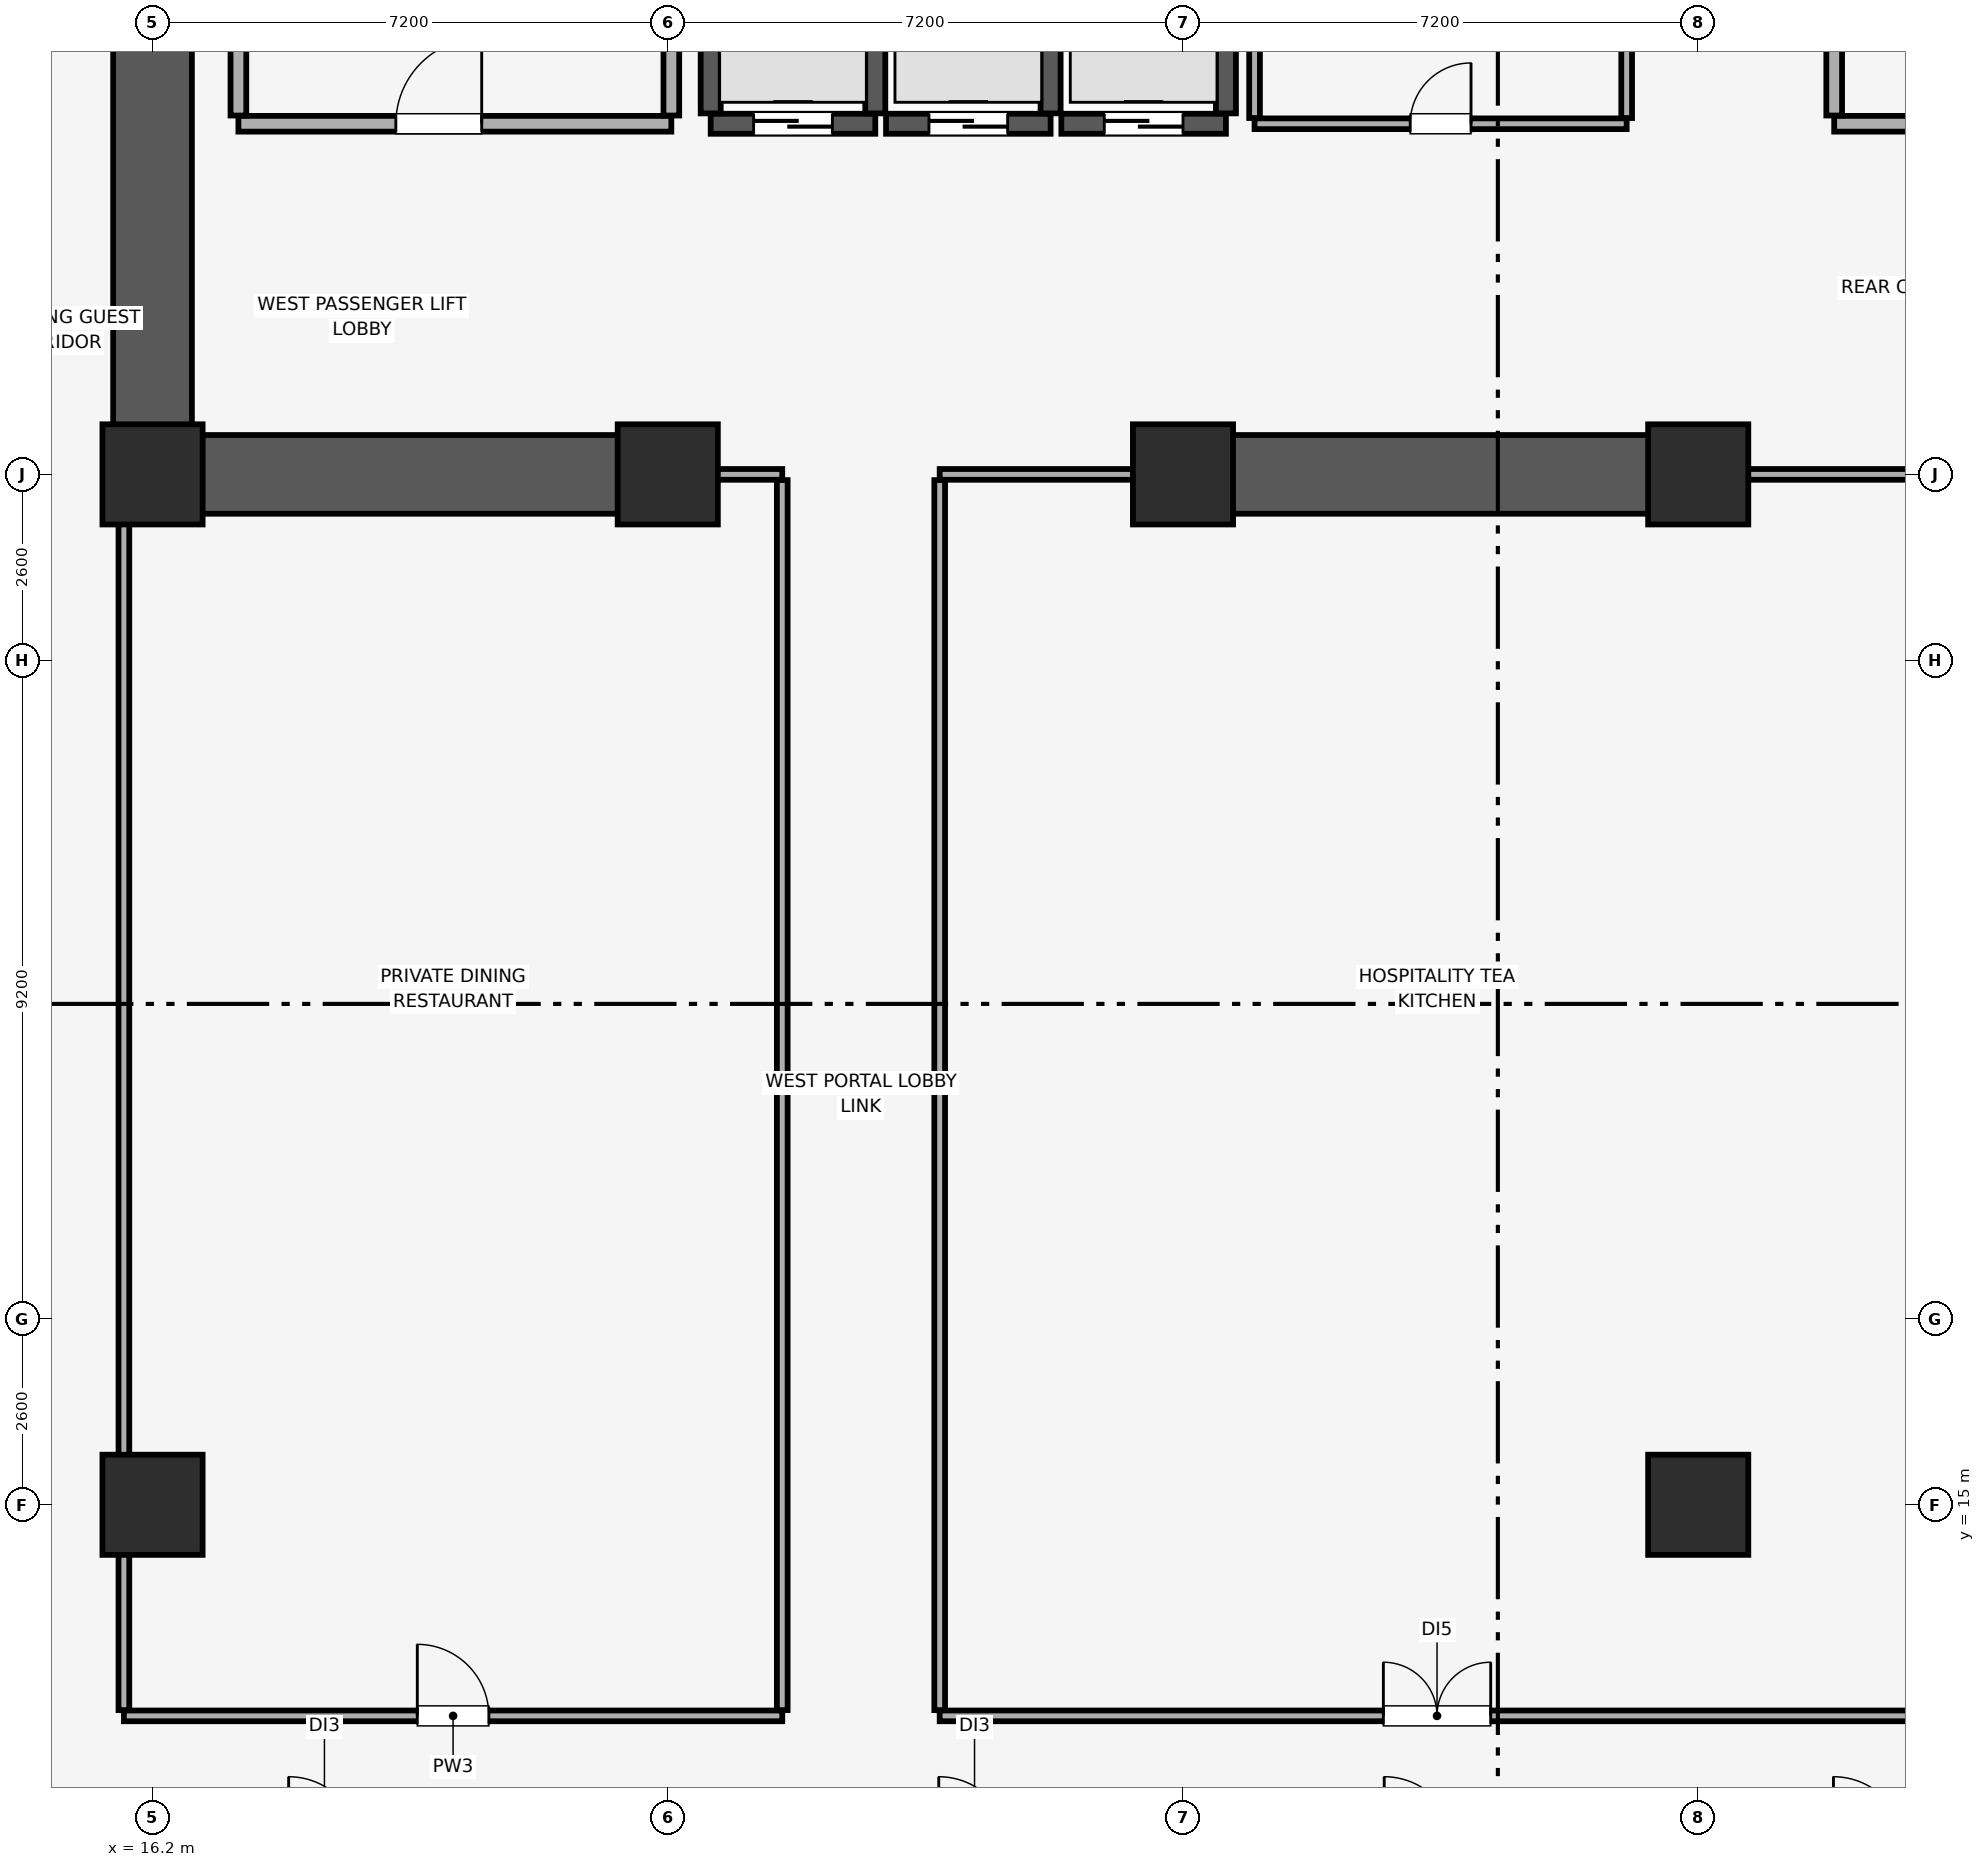
"""IFC4 building model, lengths in metres.
Left out: names, types, materials, properties, quantities, classifications, styles, units other than length and angle.
Written with IfcOpenShell. Run it as: python <this file> out.ifc"""

import sys

from ifc_helpers import new_model, si_unit, direction, frame, frame_2d, origin, origin_2d, place, context, subcontext, project, spatial, rectangle, extrude, element, fill, save


model = new_model("IFC4")
c1 = context("Model", 3, precision=1e-05, world=origin(), true_north=direction((0.0, 1.0)))
c2 = subcontext(c1, "Body", "Model", "MODEL_VIEW")
j1 = project(units=[si_unit("LENGTHUNIT", "METRE"), si_unit("PLANEANGLEUNIT", "RADIAN")], contexts=[c1])
p1 = place(None, origin())
s1 = spatial("IfcSite", under=j1, at=p1, CompositionType="ELEMENT")
p2 = place(p1, origin())
s2 = spatial("IfcBuilding", under=s1, at=p2, CompositionType="ELEMENT")
p3 = place(p2, frame((0.0, 0.0, 46.4)))
s3 = spatial("IfcBuildingStorey", under=s2, at=p3, CompositionType="ELEMENT", Elevation=46.4)
for number, where, z_axis, x_axis in (
    (1, (16.2, 15.0, 0.0), (0.0, 0.0, 1.0), (1.0, 0.0, 0.0)),
    (2, (37.8, 15.0, 0.0), (0.0, 0.0, 1.0), (1.0, 0.0, 0.0)),
    (3, (16.2, 29.4, 0.0), (0.0, 0.0, 1.0), (1.0, 0.0, 0.0)),
    (4, (23.4, 29.4, 0.0), (0.0, 0.0, 1.0), (1.0, 0.0, 0.0)),
    (5, (30.6, 29.4, 0.0), (0.0, 0.0, 1.0), (1.0, 0.0, 0.0)),
    (6, (37.8, 29.4, 0.0), (0.0, 0.0, 1.0), (1.0, 0.0, 0.0)),
):
    element("IfcColumn", number, at=place(p3, frame(where, z_axis=z_axis, x_axis=x_axis)), inside=s3, PredefinedType="COLUMN", context=c2, shape_type="SweptSolid", body=[
        extrude(rectangle(XDim=1.4, YDim=1.4, at=origin_2d()), origin(), (0.0, 0.0, 1.0), 3.51),
    ])
p4 = place(p3, frame((16.2, 29.4, 0.0), z_axis=(0.0, 0.0, 1.0), x_axis=(0.0, 1.0, 0.0)))
e7 = element("IfcWall", 7, at=p4, inside=s3, PredefinedType="SHEAR", context=c2, shape_type="SweptSolid", body=[
    extrude(rectangle(XDim=19.2, YDim=1.1, at=frame_2d((9.6, 0.0))), origin(), (0.0, 0.0, 1.0), 3.51),
])
p5 = place(p3, frame((16.755, 29.4, 0.0), z_axis=(0.0, 0.0, 1.0), x_axis=(1.0, 0.0, 0.0)))
e8 = element("IfcWall", 8, at=p5, inside=s3, PredefinedType="SHEAR", context=c2, shape_type="SweptSolid", body=[
    extrude(rectangle(XDim=6.845, YDim=1.1, at=frame_2d((3.423, 0.0))), origin(), (0.0, 0.0, 1.0), 3.51),
])
p6 = place(p3, frame((30.4, 29.4, 0.0), z_axis=(0.0, 0.0, 1.0), x_axis=(1.0, 0.0, 0.0)))
e9 = element("IfcWall", 9, at=p6, inside=s3, PredefinedType="SHEAR", context=c2, shape_type="SweptSolid", body=[
    extrude(rectangle(XDim=7.6, YDim=1.1, at=frame_2d((3.8, 0.0))), origin(), (0.0, 0.0, 1.0), 3.51),
])
p7 = place(p3, frame((24.0, 34.3, 0.0), z_axis=(0.0, 0.0, 1.0), x_axis=(1.0, 0.0, 0.0)))
e10 = element("IfcWall", 10, at=p7, inside=s3, PredefinedType="SHEAR", context=c2, shape_type="SweptSolid", body=[
    extrude(rectangle(XDim=2.3, YDim=0.28, at=frame_2d((1.15, 0.0))), origin(), (0.0, 0.0, 1.0), 3.51),
])
p8 = place(p7, frame((0.6, 0.0, 0.0)))
e11 = element("IfcOpeningElement", 11, at=p8, cuts=e10, PredefinedType="OPENING", context=c2, shape_type="SweptSolid", body=[
    extrude(rectangle(XDim=1.1, YDim=2.2, at=frame_2d((0.55, 1.1))), frame((0.0, 0.15, 0.0), z_axis=(0.0, -1.0, 0.0), x_axis=(1.0, 0.0, 0.0)), (0.0, 0.0, 1.0), 0.3),
])
for number, where, z_axis, x_axis in (
    (12, (24.0, 34.445, 0.0), (0.0, 0.0, 1.0), (0.0, 1.0, 0.0)),
    (13, (26.3, 34.445, 0.0), (0.0, 0.0, 1.0), (0.0, 1.0, 0.0)),
):
    element("IfcWall", number, at=place(p3, frame(where, z_axis=z_axis, x_axis=x_axis)), inside=s3, PredefinedType="SHEAR", context=c2, shape_type="SweptSolid", body=[
        extrude(rectangle(XDim=2.01, YDim=0.28, at=frame_2d((1.005, 0.0))), origin(), (0.0, 0.0, 1.0), 3.51),
    ])
p9 = place(p3, frame((26.45, 34.3, 0.0), z_axis=(0.0, 0.0, 1.0), x_axis=(1.0, 0.0, 0.0)))
e14 = element("IfcWall", 14, at=p9, inside=s3, PredefinedType="SHEAR", context=c2, shape_type="SweptSolid", body=[
    extrude(rectangle(XDim=2.3, YDim=0.28, at=frame_2d((1.15, 0.0))), origin(), (0.0, 0.0, 1.0), 3.51),
])
p10 = place(p9, frame((0.6, 0.0, 0.0)))
e15 = element("IfcOpeningElement", 15, at=p10, cuts=e14, PredefinedType="OPENING", context=c2, shape_type="SweptSolid", body=[
    extrude(rectangle(XDim=1.1, YDim=2.2, at=frame_2d((0.55, 1.1))), frame((0.0, 0.15, 0.0), z_axis=(0.0, -1.0, 0.0), x_axis=(1.0, 0.0, 0.0)), (0.0, 0.0, 1.0), 0.3),
])
p11 = place(p3, frame((28.75, 34.445, 0.0), z_axis=(0.0, 0.0, 1.0), x_axis=(0.0, 1.0, 0.0)))
e16 = element("IfcWall", 16, at=p11, inside=s3, PredefinedType="SHEAR", context=c2, shape_type="SweptSolid", body=[
    extrude(rectangle(XDim=2.01, YDim=0.28, at=frame_2d((1.005, 0.0))), origin(), (0.0, 0.0, 1.0), 3.51),
])
p12 = place(p3, frame((28.9, 34.3, 0.0), z_axis=(0.0, 0.0, 1.0), x_axis=(1.0, 0.0, 0.0)))
e17 = element("IfcWall", 17, at=p12, inside=s3, PredefinedType="SHEAR", context=c2, shape_type="SweptSolid", body=[
    extrude(rectangle(XDim=2.3, YDim=0.28, at=frame_2d((1.15, 0.0))), origin(), (0.0, 0.0, 1.0), 3.51),
])
p13 = place(p12, frame((0.6, 0.0, 0.0)))
e18 = element("IfcOpeningElement", 18, at=p13, cuts=e17, PredefinedType="OPENING", context=c2, shape_type="SweptSolid", body=[
    extrude(rectangle(XDim=1.1, YDim=2.2, at=frame_2d((0.55, 1.1))), frame((0.0, 0.15, 0.0), z_axis=(0.0, -1.0, 0.0), x_axis=(1.0, 0.0, 0.0)), (0.0, 0.0, 1.0), 0.3),
])
p14 = place(p3, frame((31.2, 34.445, 0.0), z_axis=(0.0, 0.0, 1.0), x_axis=(0.0, 1.0, 0.0)))
e19 = element("IfcWall", 19, at=p14, inside=s3, PredefinedType="SHEAR", context=c2, shape_type="SweptSolid", body=[
    extrude(rectangle(XDim=2.01, YDim=0.28, at=frame_2d((1.005, 0.0))), origin(), (0.0, 0.0, 1.0), 3.51),
])
p15 = place(p3, frame((17.4, 34.3, 0.0), z_axis=(0.0, 0.0, 1.0), x_axis=(1.0, 0.0, 0.0)))
e20 = element("IfcWall", 20, at=p15, inside=s3, PredefinedType="PARTITIONING", context=c2, shape_type="SweptSolid", body=[
    extrude(rectangle(XDim=6.05, YDim=0.22, at=frame_2d((3.025, 0.0))), origin(), (0.0, 0.0, 1.0), 3.51),
])
p16 = place(p15, frame((2.2, 0.0, 0.0)))
e21 = element("IfcOpeningElement", 21, at=p16, cuts=e20, PredefinedType="OPENING", context=c2, shape_type="SweptSolid", body=[
    extrude(rectangle(XDim=1.2, YDim=2.15, at=frame_2d((0.6, 1.075))), frame((0.0, 0.12, 0.0), z_axis=(0.0, -1.0, 0.0), x_axis=(1.0, 0.0, 0.0)), (0.0, 0.0, 1.0), 0.24),
])
p17 = place(p3, frame((17.4, 34.415, 0.0), z_axis=(0.0, 0.0, 1.0), x_axis=(0.0, 1.0, 0.0)))
e22 = element("IfcWall", 22, at=p17, inside=s3, PredefinedType="PARTITIONING", context=c2, shape_type="SweptSolid", body=[
    extrude(rectangle(XDim=5.43, YDim=0.22, at=frame_2d((2.715, 0.0))), origin(), (0.0, 0.0, 1.0), 3.51),
])
p18 = place(p3, frame((23.45, 34.415, 0.0), z_axis=(0.0, 0.0, 1.0), x_axis=(0.0, 1.0, 0.0)))
e23 = element("IfcWall", 23, at=p18, inside=s3, PredefinedType="PARTITIONING", context=c2, shape_type="SweptSolid", body=[
    extrude(rectangle(XDim=5.64, YDim=0.22, at=frame_2d((2.82, 0.0))), origin(), (0.0, 0.0, 1.0), 3.51),
])
p19 = place(p3, frame((39.7, 34.3, 0.0), z_axis=(0.0, 0.0, 1.0), x_axis=(1.0, 0.0, 0.0)))
e24 = element("IfcWall", 24, at=p19, inside=s3, PredefinedType="PARTITIONING", context=c2, shape_type="SweptSolid", body=[
    extrude(rectangle(XDim=4.6, YDim=0.22, at=frame_2d((2.3, 0.0))), origin(), (0.0, 0.0, 1.0), 3.51),
])
p20 = place(p19, frame((1.7, 0.0, 0.0)))
e25 = element("IfcOpeningElement", 25, at=p20, cuts=e24, PredefinedType="OPENING", context=c2, shape_type="SweptSolid", body=[
    extrude(rectangle(XDim=1.2, YDim=2.15, at=frame_2d((0.6, 1.075))), frame((0.0, 0.12, 0.0), z_axis=(0.0, -1.0, 0.0), x_axis=(1.0, 0.0, 0.0)), (0.0, 0.0, 1.0), 0.24),
])
p21 = place(p3, frame((39.7, 34.415, 0.0), z_axis=(0.0, 0.0, 1.0), x_axis=(0.0, 1.0, 0.0)))
e26 = element("IfcWall", 26, at=p21, inside=s3, PredefinedType="PARTITIONING", context=c2, shape_type="SweptSolid", body=[
    extrude(rectangle(XDim=5.785, YDim=0.22, at=frame_2d((2.893, 0.0))), origin(), (0.0, 0.0, 1.0), 3.51),
])
p22 = place(p3, frame((31.6, 34.3, 0.0), z_axis=(0.0, 0.0, 1.0), x_axis=(1.0, 0.0, 0.0)))
e27 = element("IfcWall", 27, at=p22, inside=s3, PredefinedType="PARTITIONING", context=c2, shape_type="SweptSolid", body=[
    extrude(rectangle(XDim=5.2, YDim=0.15, at=frame_2d((2.6, 0.0))), origin(), (0.0, 0.0, 1.0), 3.51),
])
p23 = place(p22, frame((2.175, 0.0, 0.0)))
e28 = element("IfcOpeningElement", 28, at=p23, cuts=e27, PredefinedType="OPENING", context=c2, shape_type="SweptSolid", body=[
    extrude(rectangle(XDim=0.85, YDim=2.1, at=frame_2d((0.425, 1.05))), frame((0.0, 0.085, 0.0), z_axis=(0.0, -1.0, 0.0), x_axis=(1.0, 0.0, 0.0)), (0.0, 0.0, 1.0), 0.17),
])
for number, where, z_axis, x_axis in (
    (29, (31.6, 34.38, 0.0), (0.0, 0.0, 1.0), (0.0, 1.0, 0.0)),
    (30, (36.8, 34.38, 0.0), (0.0, 0.0, 1.0), (0.0, 1.0, 0.0)),
):
    element("IfcWall", number, at=place(p3, frame(where, z_axis=z_axis, x_axis=x_axis)), inside=s3, PredefinedType="PARTITIONING", context=c2, shape_type="SweptSolid", body=[
        extrude(rectangle(XDim=4.94, YDim=0.15, at=frame_2d((2.47, 0.0))), origin(), (0.0, 0.0, 1.0), 3.51),
    ])
p24 = place(p3, frame((15.8, 12.05, 0.0), z_axis=(0.0, 0.0, 1.0), x_axis=(1.0, 0.0, 0.0)))
e31 = element("IfcWall", 31, at=p24, inside=s3, PredefinedType="PARTITIONING", context=c2, shape_type="SweptSolid", body=[
    extrude(rectangle(XDim=9.2, YDim=0.15, at=frame_2d((4.6, 0.0))), origin(), (0.0, 0.0, 1.0), 3.51),
])
p25 = place(p24, frame((4.1, 0.0, 0.0)))
e32 = element("IfcOpeningElement", 32, at=p25, cuts=e31, PredefinedType="OPENING", context=c2, shape_type="SweptSolid", body=[
    extrude(rectangle(XDim=1.0, YDim=2.15, at=frame_2d((0.5, 1.075))), frame((0.0, 0.085, 0.0), z_axis=(0.0, -1.0, 0.0), x_axis=(1.0, 0.0, 0.0)), (0.0, 0.0, 1.0), 0.17),
])
p26 = place(p3, frame((23.61, 29.4, 0.0), z_axis=(0.0, 0.0, 1.0), x_axis=(1.0, 0.0, 0.0)))
e33 = element("IfcWall", 33, at=p26, inside=s3, PredefinedType="PARTITIONING", context=c2, shape_type="SweptSolid", body=[
    extrude(rectangle(XDim=1.39, YDim=0.15, at=frame_2d((0.695, 0.0))), origin(), (0.0, 0.0, 1.0), 2.41),
])
p27 = place(p3, frame((15.8, 12.13, 0.0), z_axis=(0.0, 0.0, 1.0), x_axis=(0.0, 1.0, 0.0)))
e34 = element("IfcWall", 34, at=p27, inside=s3, PredefinedType="PARTITIONING", context=c2, shape_type="SweptSolid", body=[
    extrude(rectangle(XDim=17.26, YDim=0.15, at=frame_2d((8.63, 0.0))), origin(), (0.0, 0.0, 1.0), 3.51),
])
p28 = place(p3, frame((25.0, 12.13, 0.0), z_axis=(0.0, 0.0, 1.0), x_axis=(0.0, 1.0, 0.0)))
e35 = element("IfcWall", 35, at=p28, inside=s3, PredefinedType="PARTITIONING", context=c2, shape_type="SweptSolid", body=[
    extrude(rectangle(XDim=17.19, YDim=0.15, at=frame_2d((8.595, 0.0))), origin(), (0.0, 0.0, 1.0), 3.51),
])
p29 = place(p3, frame((27.2, 12.05, 0.0), z_axis=(0.0, 0.0, 1.0), x_axis=(1.0, 0.0, 0.0)))
e36 = element("IfcWall", 36, at=p29, inside=s3, PredefinedType="PARTITIONING", context=c2, shape_type="SweptSolid", body=[
    extrude(rectangle(XDim=13.9, YDim=0.15, at=frame_2d((6.95, 0.0))), origin(), (0.0, 0.0, 1.0), 3.51),
])
p30 = place(p29, frame((6.2, 0.0, 0.0)))
e37 = element("IfcOpeningElement", 37, at=p30, cuts=e36, PredefinedType="OPENING", context=c2, shape_type="SweptSolid", body=[
    extrude(rectangle(XDim=1.5, YDim=2.25, at=frame_2d((0.75, 1.125))), frame((0.0, 0.085, 0.0), z_axis=(0.0, -1.0, 0.0), x_axis=(1.0, 0.0, 0.0)), (0.0, 0.0, 1.0), 0.17),
])
p31 = place(p3, frame((27.2, 29.4, 0.0), z_axis=(0.0, 0.0, 1.0), x_axis=(1.0, 0.0, 0.0)))
e38 = element("IfcWall", 38, at=p31, inside=s3, PredefinedType="PARTITIONING", context=c2, shape_type="SweptSolid", body=[
    extrude(rectangle(XDim=3.19, YDim=0.15, at=frame_2d((1.595, 0.0))), origin(), (0.0, 0.0, 1.0), 2.41),
])
p32 = place(p3, frame((38.01, 29.4, 0.0), z_axis=(0.0, 0.0, 1.0), x_axis=(1.0, 0.0, 0.0)))
e39 = element("IfcWall", 39, at=p32, inside=s3, PredefinedType="PARTITIONING", context=c2, shape_type="SweptSolid", body=[
    extrude(rectangle(XDim=3.09, YDim=0.15, at=frame_2d((1.545, 0.0))), origin(), (0.0, 0.0, 1.0), 2.41),
])
p33 = place(p3, frame((27.2, 12.13, 0.0), z_axis=(0.0, 0.0, 1.0), x_axis=(0.0, 1.0, 0.0)))
e40 = element("IfcWall", 40, at=p33, inside=s3, PredefinedType="PARTITIONING", context=c2, shape_type="SweptSolid", body=[
    extrude(rectangle(XDim=17.19, YDim=0.15, at=frame_2d((8.595, 0.0))), origin(), (0.0, 0.0, 1.0), 2.898),
])
p34 = place(p8, origin())
e41 = element("IfcDoor", 41, at=p34, inside=s3, OperationType="DOUBLE_DOOR_SLIDING", PredefinedType="DOOR", context=c2, shape_type="SweptSolid", body=[
    extrude(rectangle(XDim=1.1, YDim=2.2, at=frame_2d((0.55, 1.1))), frame((0.0, 0.025, 0.0), z_axis=(0.0, -1.0, 0.0), x_axis=(1.0, 0.0, 0.0)), (0.0, 0.0, 1.0), 0.05),
])
fill(e11, e41)
p35 = place(p10, origin())
e42 = element("IfcDoor", 42, at=p35, inside=s3, OperationType="DOUBLE_DOOR_SLIDING", PredefinedType="DOOR", context=c2, shape_type="SweptSolid", body=[
    extrude(rectangle(XDim=1.1, YDim=2.2, at=frame_2d((0.55, 1.1))), frame((0.0, 0.025, 0.0), z_axis=(0.0, -1.0, 0.0), x_axis=(1.0, 0.0, 0.0)), (0.0, 0.0, 1.0), 0.05),
])
fill(e15, e42)
p36 = place(p13, origin())
e43 = element("IfcDoor", 43, at=p36, inside=s3, OperationType="DOUBLE_DOOR_SLIDING", PredefinedType="DOOR", context=c2, shape_type="SweptSolid", body=[
    extrude(rectangle(XDim=1.1, YDim=2.2, at=frame_2d((0.55, 1.1))), frame((0.0, 0.025, 0.0), z_axis=(0.0, -1.0, 0.0), x_axis=(1.0, 0.0, 0.0)), (0.0, 0.0, 1.0), 0.05),
])
fill(e18, e43)
p37 = place(p16, origin())
e44 = element("IfcDoor", 44, at=p37, inside=s3, OperationType="SINGLE_SWING_RIGHT", PredefinedType="DOOR", context=c2, shape_type="SweptSolid", body=[
    extrude(rectangle(XDim=1.2, YDim=2.15, at=frame_2d((0.6, 1.075))), frame((0.0, 0.025, 0.0), z_axis=(0.0, -1.0, 0.0), x_axis=(1.0, 0.0, 0.0)), (0.0, 0.0, 1.0), 0.05),
])
fill(e21, e44)
p38 = place(p23, origin())
e45 = element("IfcDoor", 45, at=p38, inside=s3, OperationType="SINGLE_SWING_RIGHT", PredefinedType="DOOR", context=c2, shape_type="SweptSolid", body=[
    extrude(rectangle(XDim=0.85, YDim=2.1, at=frame_2d((0.425, 1.05))), frame((0.0, 0.025, 0.0), z_axis=(0.0, -1.0, 0.0), x_axis=(1.0, 0.0, 0.0)), (0.0, 0.0, 1.0), 0.05),
])
fill(e28, e45)
p39 = place(p25, origin())
e46 = element("IfcDoor", 46, at=p39, inside=s3, OperationType="SINGLE_SWING_LEFT", PredefinedType="DOOR", context=c2, shape_type="SweptSolid", body=[
    extrude(rectangle(XDim=1.0, YDim=2.15, at=frame_2d((0.5, 1.075))), frame((0.0, 0.025, 0.0), z_axis=(0.0, -1.0, 0.0), x_axis=(1.0, 0.0, 0.0)), (0.0, 0.0, 1.0), 0.05),
])
fill(e32, e46)
p40 = place(p30, origin())
e47 = element("IfcDoor", 47, at=p40, inside=s3, OperationType="DOUBLE_DOOR_SINGLE_SWING", PredefinedType="DOOR", context=c2, shape_type="SweptSolid", body=[
    extrude(rectangle(XDim=1.5, YDim=2.25, at=frame_2d((0.75, 1.125))), frame((0.0, 0.025, 0.0), z_axis=(0.0, -1.0, 0.0), x_axis=(1.0, 0.0, 0.0)), (0.0, 0.0, 1.0), 0.05),
])
fill(e37, e47)
save(model, sys.argv[1])
